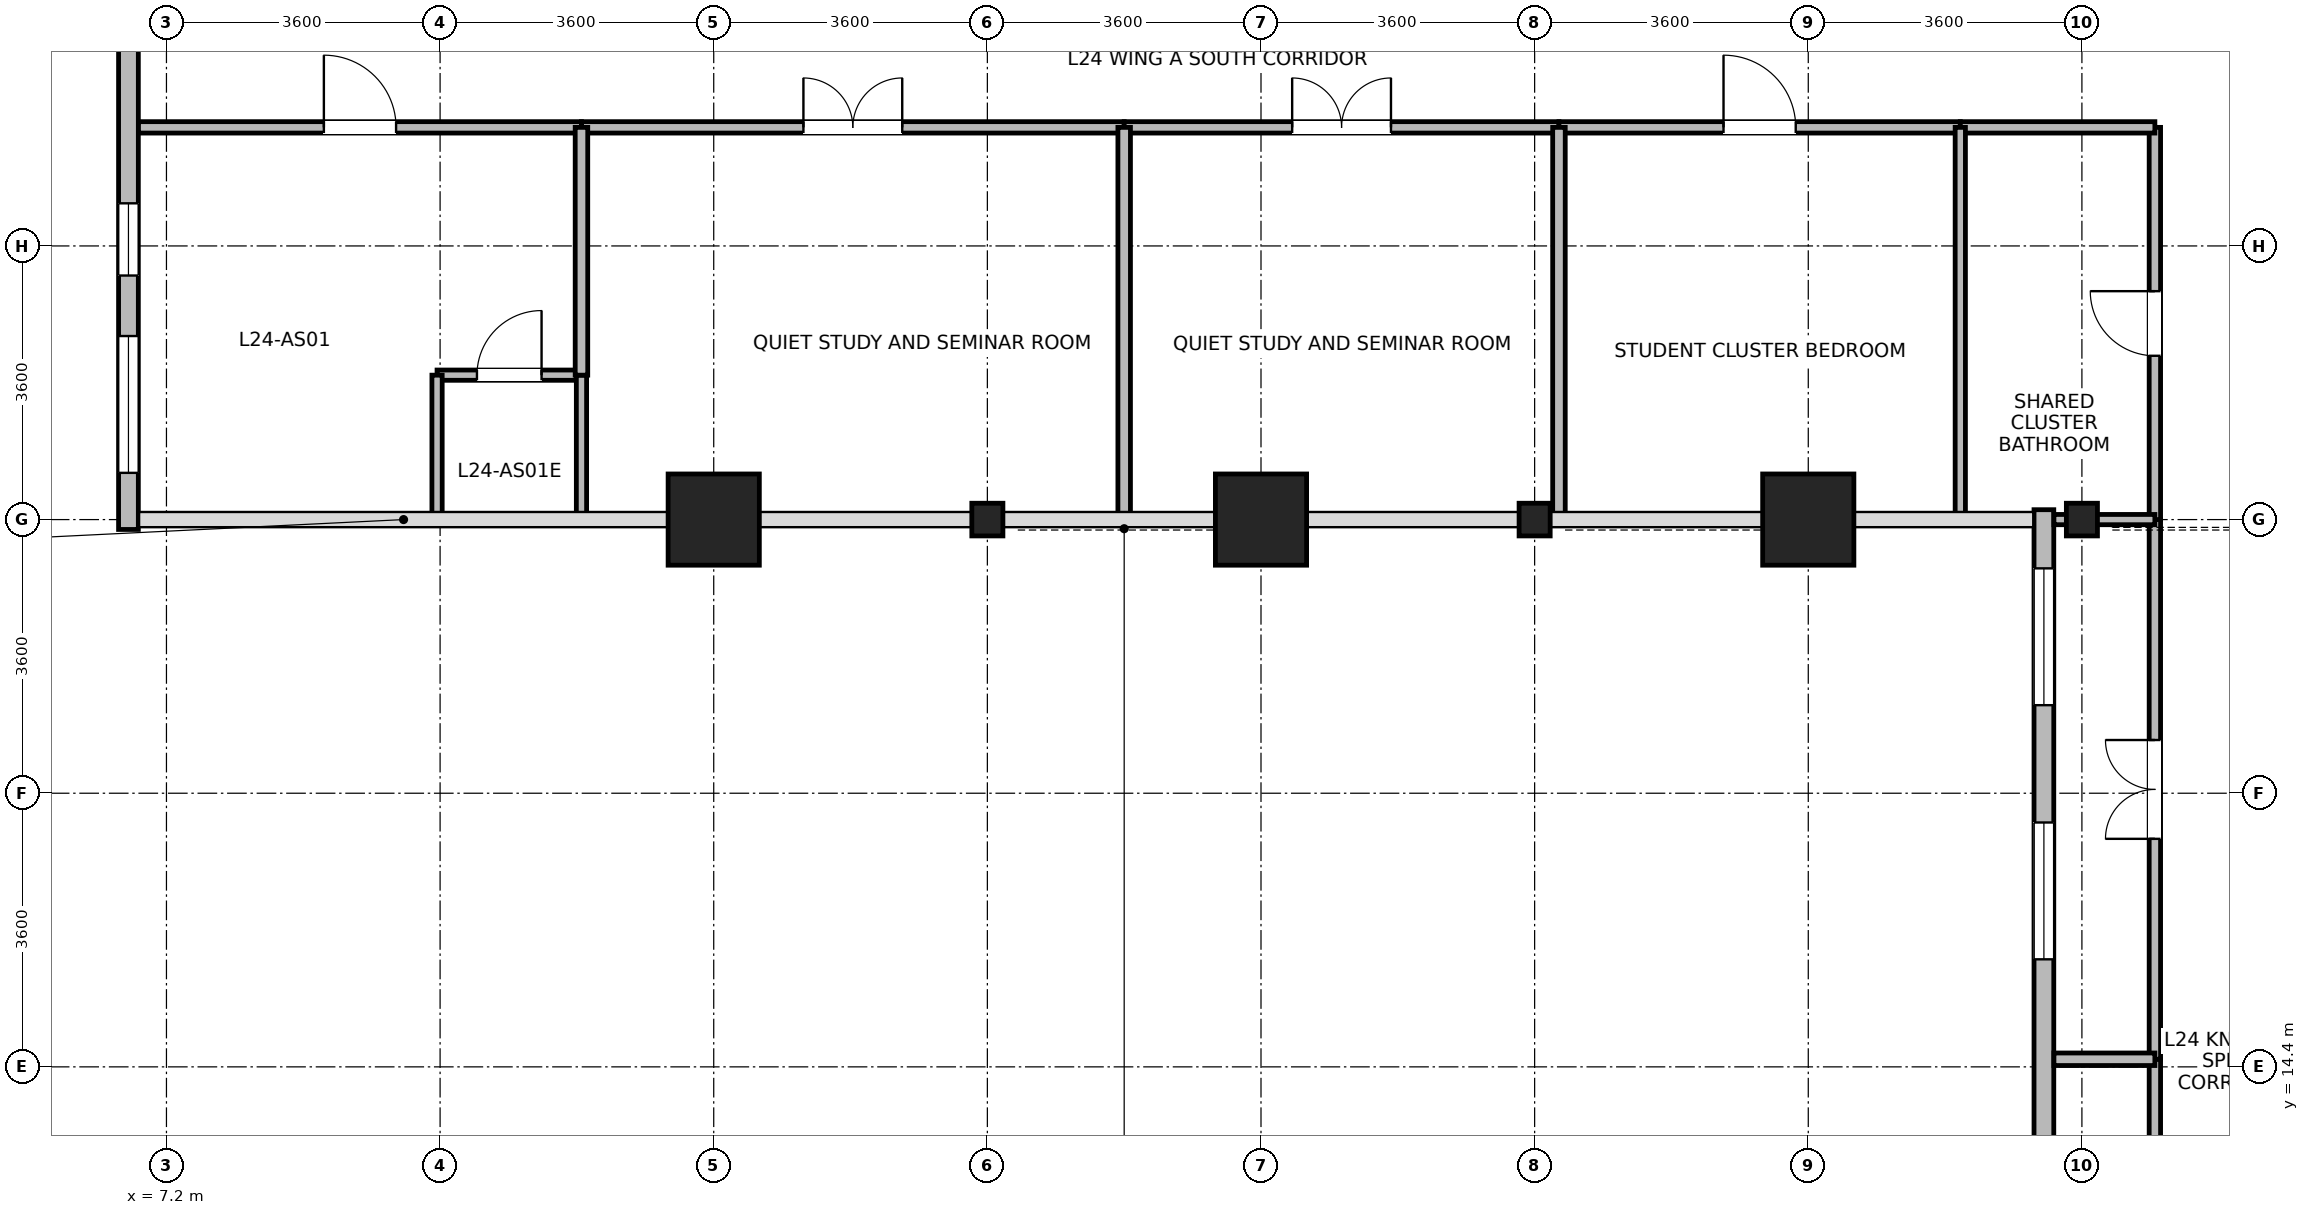
"""IFC4 building model, lengths in metres.
Left out: names, types, materials, properties, quantities, classifications, styles, units other than length and angle.
Written with IfcOpenShell. Run it as: python <this file> out.ifc"""

import sys

from ifc_helpers import new_model, si_unit, direction, frame, frame_2d, origin, origin_2d, place, context, subcontext, project, spatial, rectangle, i_section, extrude, source, transform, mapped, element, fill, save


model = new_model("IFC4")
c1 = context("Model", 3, precision=1e-05, world=origin(), true_north=direction((0.0, 1.0)))
c2 = subcontext(c1, "Body", "Model", "MODEL_VIEW")
j1 = project(units=[si_unit("LENGTHUNIT", "METRE"), si_unit("PLANEANGLEUNIT", "RADIAN")], contexts=[c1])
p1 = place(None, origin())
s1 = spatial("IfcSite", under=j1, at=p1, CompositionType="ELEMENT")
p2 = place(p1, origin())
s2 = spatial("IfcBuilding", under=s1, at=p2, CompositionType="ELEMENT")
p3 = place(p2, frame((0.0, 0.0, 97.1)))
s3 = spatial("IfcBuildingStorey", under=s2, at=p3, CompositionType="ELEMENT", Elevation=97.1)
m1 = source(origin(), c2, "Body", "SweptSolid", [
    extrude(rectangle(XDim=1.2, YDim=1.2, at=origin_2d()), origin(), (0.0, 0.0, 1.0), 3.7),
])
for number, where, z_axis, x_axis in (
    (1, (14.4, 21.6, 0.0), (0.0, 0.0, 1.0), (1.0, 0.0, 0.0)),
    (2, (21.6, 21.6, 0.0), (0.0, 0.0, 1.0), (1.0, 0.0, 0.0)),
    (3, (28.8, 21.6, 0.0), (0.0, 0.0, 1.0), (1.0, 0.0, 0.0)),
):
    element("IfcColumn", number, at=place(p3, frame(where, z_axis=z_axis, x_axis=x_axis)), inside=s3, PredefinedType="COLUMN", context=c2, shape_type="MappedRepresentation", body=[
        mapped(m1, transform((0.0, 0.0, 0.0), x_axis=(1.0, 0.0, 0.0), y_axis=(0.0, 1.0, 0.0), z_axis=(0.0, 0.0, 1.0), scale=1.0)),
    ])
m2 = source(origin(), c2, "Body", "SweptSolid", [
    extrude(i_section(OverallWidth=0.409, OverallDepth=0.43, WebThickness=0.024, FlangeThickness=0.033, FilletRadius=0.015, at=origin_2d()), origin(), (0.0, 0.0, 1.0), 3.7),
])
for number, where, z_axis, x_axis in (
    (4, (18.0, 21.6, 0.0), (0.0, 0.0, 1.0), (1.0, 0.0, 0.0)),
    (5, (25.2, 21.6, 0.0), (0.0, 0.0, 1.0), (1.0, 0.0, 0.0)),
    (6, (32.4, 21.6, 0.0), (0.0, 0.0, 1.0), (1.0, 0.0, 0.0)),
):
    element("IfcColumn", number, at=place(p3, frame(where, z_axis=z_axis, x_axis=x_axis)), inside=s3, PredefinedType="COLUMN", context=c2, shape_type="MappedRepresentation", body=[
        mapped(m2, transform((0.0, 0.0, 0.0), x_axis=(1.0, 0.0, 0.0), y_axis=(0.0, 1.0, 0.0), z_axis=(0.0, 0.0, 1.0), scale=1.0)),
    ])
p4 = place(p3, frame((6.7, 21.47, 0.0), z_axis=(0.0, 0.0, 1.0), x_axis=(0.0, 1.0, 0.0)))
e7 = element("IfcWall", 7, at=p4, inside=s3, PredefinedType="STANDARD", context=c2, shape_type="SweptSolid", body=[
    extrude(rectangle(XDim=6.579, YDim=0.26, at=frame_2d((3.29, 0.0))), origin(), (0.0, 0.0, 1.0), 3.43),
])
p5 = place(p4, frame((0.745, 0.0, 0.85)))
e8 = element("IfcOpeningElement", 8, at=p5, cuts=e7, PredefinedType="OPENING", context=c2, shape_type="SweptSolid", body=[
    extrude(rectangle(XDim=1.8, YDim=1.85, at=frame_2d((0.9, 0.925))), frame((0.0, 0.14, 0.0), z_axis=(0.0, -1.0, 0.0), x_axis=(1.0, 0.0, 0.0)), (0.0, 0.0, 1.0), 0.28),
])
p6 = place(p4, frame((3.341, 0.0, 0.85)))
e9 = element("IfcOpeningElement", 9, at=p6, cuts=e7, PredefinedType="OPENING", context=c2, shape_type="SweptSolid", body=[
    extrude(rectangle(XDim=0.95, YDim=1.75, at=frame_2d((0.475, 0.875))), frame((0.0, 0.14, 0.0), z_axis=(0.0, -1.0, 0.0), x_axis=(1.0, 0.0, 0.0)), (0.0, 0.0, 1.0), 0.28),
])
p7 = place(p3, frame((31.9, 1.67, 0.0), z_axis=(0.0, 0.0, 1.0), x_axis=(0.0, 1.0, 0.0)))
e10 = element("IfcWall", 10, at=p7, inside=s3, PredefinedType="STANDARD", context=c2, shape_type="SweptSolid", body=[
    extrude(rectangle(XDim=20.06, YDim=0.26, at=frame_2d((10.03, 0.0))), origin(), (0.0, 0.0, 1.0), 3.43),
])
p8 = place(p7, frame((0.772, 0.0, 0.85)))
e11 = element("IfcOpeningElement", 11, at=p8, cuts=e10, PredefinedType="OPENING", context=c2, shape_type="SweptSolid", body=[
    extrude(rectangle(XDim=1.8, YDim=1.85, at=frame_2d((0.9, 0.925))), frame((0.0, 0.14, 0.0), z_axis=(0.0, -1.0, 0.0), x_axis=(1.0, 0.0, 0.0)), (0.0, 0.0, 1.0), 0.28),
])
p9 = place(p7, frame((7.458, 0.0, 0.85)))
e12 = element("IfcOpeningElement", 12, at=p9, cuts=e10, PredefinedType="OPENING", context=c2, shape_type="SweptSolid", body=[
    extrude(rectangle(XDim=1.8, YDim=1.85, at=frame_2d((0.9, 0.925))), frame((0.0, 0.14, 0.0), z_axis=(0.0, -1.0, 0.0), x_axis=(1.0, 0.0, 0.0)), (0.0, 0.0, 1.0), 0.28),
])
p10 = place(p7, frame((14.145, 0.0, 0.85)))
e13 = element("IfcOpeningElement", 13, at=p10, cuts=e10, PredefinedType="OPENING", context=c2, shape_type="SweptSolid", body=[
    extrude(rectangle(XDim=1.8, YDim=1.85, at=frame_2d((0.9, 0.925))), frame((0.0, 0.14, 0.0), z_axis=(0.0, -1.0, 0.0), x_axis=(1.0, 0.0, 0.0)), (0.0, 0.0, 1.0), 0.28),
])
p11 = place(p7, frame((17.488, 0.0, 0.85)))
e14 = element("IfcOpeningElement", 14, at=p11, cuts=e10, PredefinedType="OPENING", context=c2, shape_type="SweptSolid", body=[
    extrude(rectangle(XDim=1.8, YDim=1.85, at=frame_2d((0.9, 0.925))), frame((0.0, 0.14, 0.0), z_axis=(0.0, -1.0, 0.0), x_axis=(1.0, 0.0, 0.0)), (0.0, 0.0, 1.0), 0.28),
])
p12 = place(p3, frame((10.76, 23.5, 0.0), z_axis=(0.0, 0.0, 1.0), x_axis=(1.0, 0.0, 0.0)))
e15 = element("IfcWall", 15, at=p12, inside=s3, PredefinedType="PARTITIONING", context=c2, shape_type="SweptSolid", body=[
    extrude(rectangle(XDim=1.9, YDim=0.135, at=frame_2d((0.95, 0.0))), origin(), (0.0, 0.0, 1.0), 3.43),
])
p13 = place(p12, frame((0.525, 0.0, 0.0)))
e16 = element("IfcOpeningElement", 16, at=p13, cuts=e15, PredefinedType="OPENING", context=c2, shape_type="SweptSolid", body=[
    extrude(rectangle(XDim=0.85, YDim=2.04, at=frame_2d((0.425, 1.02))), frame((0.0, 0.078, 0.0), z_axis=(0.0, -1.0, 0.0), x_axis=(1.0, 0.0, 0.0)), (0.0, 0.0, 1.0), 0.155),
])
for number, where, z_axis, x_axis in (
    (17, (10.76, 21.62, 0.0), (0.0, 0.0, 1.0), (0.0, 1.0, 0.0)),
    (18, (12.66, 21.62, 0.0), (0.0, 0.0, 1.0), (0.0, 1.0, 0.0)),
):
    element("IfcWall", number, at=place(p3, frame(where, z_axis=z_axis, x_axis=x_axis)), inside=s3, PredefinedType="PARTITIONING", context=c2, shape_type="SweptSolid", body=[
        extrude(rectangle(XDim=1.88, YDim=0.135, at=frame_2d((0.94, 0.0))), origin(), (0.0, 0.0, 1.0), 3.43),
    ])
p14 = place(p3, frame((33.36, 7.24, 0.0), z_axis=(0.0, 0.0, 1.0), x_axis=(0.0, 1.0, 0.0)))
e19 = element("IfcWall", 19, at=p14, inside=s3, PredefinedType="PARTITIONING", context=c2, shape_type="SweptSolid", body=[
    extrude(rectangle(XDim=7.26, YDim=0.15, at=frame_2d((3.63, 0.0))), origin(), (0.0, 0.0, 1.0), 3.43),
])
p15 = place(p14, frame((2.98, 0.0, 0.0)))
e20 = element("IfcOpeningElement", 20, at=p15, cuts=e19, PredefinedType="OPENING", context=c2, shape_type="SweptSolid", body=[
    extrude(rectangle(XDim=1.3, YDim=2.12, at=frame_2d((0.65, 1.06))), frame((0.0, 0.085, 0.0), z_axis=(0.0, -1.0, 0.0), x_axis=(1.0, 0.0, 0.0)), (0.0, 0.0, 1.0), 0.17),
])
p16 = place(p3, frame((12.66, 26.76, 0.0), z_axis=(0.0, 0.0, 1.0), x_axis=(1.0, 0.0, 0.0)))
e21 = element("IfcWall", 21, at=p16, inside=s3, PredefinedType="PARTITIONING", context=c2, shape_type="SweptSolid", body=[
    extrude(rectangle(XDim=7.14, YDim=0.15, at=frame_2d((3.57, 0.0))), origin(), (0.0, 0.0, 1.0), 3.43),
])
p17 = place(p16, frame((2.92, 0.0, 0.0)))
e22 = element("IfcOpeningElement", 22, at=p17, cuts=e21, PredefinedType="OPENING", context=c2, shape_type="SweptSolid", body=[
    extrude(rectangle(XDim=1.3, YDim=2.12, at=frame_2d((0.65, 1.06))), frame((0.0, 0.085, 0.0), z_axis=(0.0, -1.0, 0.0), x_axis=(1.0, 0.0, 0.0)), (0.0, 0.0, 1.0), 0.17),
])
p18 = place(p3, frame((33.36, 14.5, 0.0), z_axis=(0.0, 0.0, 1.0), x_axis=(0.0, 1.0, 0.0)))
e23 = element("IfcWall", 23, at=p18, inside=s3, PredefinedType="PARTITIONING", context=c2, shape_type="SweptSolid", body=[
    extrude(rectangle(XDim=7.1, YDim=0.15, at=frame_2d((3.55, 0.0))), origin(), (0.0, 0.0, 1.0), 3.43),
])
p19 = place(p18, frame((2.9, 0.0, 0.0)))
e24 = element("IfcOpeningElement", 24, at=p19, cuts=e23, PredefinedType="OPENING", context=c2, shape_type="SweptSolid", body=[
    extrude(rectangle(XDim=1.3, YDim=2.12, at=frame_2d((0.65, 1.06))), frame((0.0, 0.085, 0.0), z_axis=(0.0, -1.0, 0.0), x_axis=(1.0, 0.0, 0.0)), (0.0, 0.0, 1.0), 0.17),
])
p20 = place(p3, frame((6.832, 26.76, 0.0), z_axis=(0.0, 0.0, 1.0), x_axis=(1.0, 0.0, 0.0)))
e25 = element("IfcWall", 25, at=p20, inside=s3, PredefinedType="PARTITIONING", context=c2, shape_type="SweptSolid", body=[
    extrude(rectangle(XDim=5.828, YDim=0.15, at=frame_2d((2.914, 0.0))), origin(), (0.0, 0.0, 1.0), 3.43),
])
p21 = place(p20, frame((2.439, 0.0, 0.0)))
e26 = element("IfcOpeningElement", 26, at=p21, cuts=e25, PredefinedType="OPENING", context=c2, shape_type="SweptSolid", body=[
    extrude(rectangle(XDim=0.95, YDim=2.1, at=frame_2d((0.475, 1.05))), frame((0.0, 0.085, 0.0), z_axis=(0.0, -1.0, 0.0), x_axis=(1.0, 0.0, 0.0)), (0.0, 0.0, 1.0), 0.17),
])
p22 = place(p3, frame((19.8, 26.76, 0.0), z_axis=(0.0, 0.0, 1.0), x_axis=(1.0, 0.0, 0.0)))
e27 = element("IfcWall", 27, at=p22, inside=s3, PredefinedType="PARTITIONING", context=c2, shape_type="SweptSolid", body=[
    extrude(rectangle(XDim=5.72, YDim=0.15, at=frame_2d((2.86, 0.0))), origin(), (0.0, 0.0, 1.0), 3.43),
])
p23 = place(p22, frame((2.21, 0.0, 0.0)))
e28 = element("IfcOpeningElement", 28, at=p23, cuts=e27, PredefinedType="OPENING", context=c2, shape_type="SweptSolid", body=[
    extrude(rectangle(XDim=1.3, YDim=2.12, at=frame_2d((0.65, 1.06))), frame((0.0, 0.085, 0.0), z_axis=(0.0, -1.0, 0.0), x_axis=(1.0, 0.0, 0.0)), (0.0, 0.0, 1.0), 0.17),
])
p24 = place(p3, frame((25.52, 26.76, 0.0), z_axis=(0.0, 0.0, 1.0), x_axis=(1.0, 0.0, 0.0)))
e29 = element("IfcWall", 29, at=p24, inside=s3, PredefinedType="PARTITIONING", context=c2, shape_type="SweptSolid", body=[
    extrude(rectangle(XDim=5.28, YDim=0.15, at=frame_2d((2.64, 0.0))), origin(), (0.0, 0.0, 1.0), 3.43),
])
p25 = place(p24, frame((2.165, 0.0, 0.0)))
e30 = element("IfcOpeningElement", 30, at=p25, cuts=e29, PredefinedType="OPENING", context=c2, shape_type="SweptSolid", body=[
    extrude(rectangle(XDim=0.95, YDim=2.1, at=frame_2d((0.475, 1.05))), frame((0.0, 0.085, 0.0), z_axis=(0.0, -1.0, 0.0), x_axis=(1.0, 0.0, 0.0)), (0.0, 0.0, 1.0), 0.17),
])
p26 = place(p3, frame((33.36, 21.6, 0.0), z_axis=(0.0, 0.0, 1.0), x_axis=(0.0, 1.0, 0.0)))
e31 = element("IfcWall", 31, at=p26, inside=s3, PredefinedType="PARTITIONING", context=c2, shape_type="SweptSolid", body=[
    extrude(rectangle(XDim=5.16, YDim=0.15, at=frame_2d((2.58, 0.0))), origin(), (0.0, 0.0, 1.0), 3.43),
])
p27 = place(p26, frame((2.155, 0.0, 0.0)))
e32 = element("IfcOpeningElement", 32, at=p27, cuts=e31, PredefinedType="OPENING", context=c2, shape_type="SweptSolid", body=[
    extrude(rectangle(XDim=0.85, YDim=2.04, at=frame_2d((0.425, 1.02))), frame((0.0, 0.085, 0.0), z_axis=(0.0, -1.0, 0.0), x_axis=(1.0, 0.0, 0.0)), (0.0, 0.0, 1.0), 0.17),
])
p28 = place(p3, frame((30.8, 26.76, 0.0), z_axis=(0.0, 0.0, 1.0), x_axis=(1.0, 0.0, 0.0)))
e33 = element("IfcWall", 33, at=p28, inside=s3, PredefinedType="PARTITIONING", context=c2, shape_type="SweptSolid", body=[
    extrude(rectangle(XDim=2.56, YDim=0.15, at=frame_2d((1.28, 0.0))), origin(), (0.0, 0.0, 1.0), 3.43),
])
for number, where, z_axis, x_axis in (
    (34, (19.8, 21.62, 0.0), (0.0, 0.0, 1.0), (0.0, 1.0, 0.0)),
    (35, (25.52, 21.62, 0.0), (0.0, 0.0, 1.0), (0.0, 1.0, 0.0)),
):
    element("IfcWall", number, at=place(p3, frame(where, z_axis=z_axis, x_axis=x_axis)), inside=s3, PredefinedType="PARTITIONING", context=c2, shape_type="SweptSolid", body=[
        extrude(rectangle(XDim=5.14, YDim=0.165, at=frame_2d((2.57, 0.0))), origin(), (0.0, 0.0, 1.0), 3.43),
    ])
p29 = place(p3, frame((30.8, 21.62, 0.0), z_axis=(0.0, 0.0, 1.0), x_axis=(0.0, 1.0, 0.0)))
e36 = element("IfcWall", 36, at=p29, inside=s3, PredefinedType="PARTITIONING", context=c2, shape_type="SweptSolid", body=[
    extrude(rectangle(XDim=5.14, YDim=0.135, at=frame_2d((2.57, 0.0))), origin(), (0.0, 0.0, 1.0), 3.43),
])
p30 = place(p3, frame((12.66, 23.5, 0.0), z_axis=(0.0, 0.0, 1.0), x_axis=(0.0, 1.0, 0.0)))
e37 = element("IfcWall", 37, at=p30, inside=s3, PredefinedType="PARTITIONING", context=c2, shape_type="SweptSolid", body=[
    extrude(rectangle(XDim=3.26, YDim=0.165, at=frame_2d((1.63, 0.0))), origin(), (0.0, 0.0, 1.0), 3.43),
])
p31 = place(p3, frame((32.032, 14.5, 0.0), z_axis=(0.0, 0.0, 1.0), x_axis=(1.0, 0.0, 0.0)))
e38 = element("IfcWall", 38, at=p31, inside=s3, PredefinedType="PARTITIONING", context=c2, shape_type="SweptSolid", body=[
    extrude(rectangle(XDim=1.328, YDim=0.165, at=frame_2d((0.664, 0.0))), origin(), (0.0, 0.0, 1.0), 3.43),
])
p32 = place(p3, frame((32.032, 21.6, 0.0), z_axis=(0.0, 0.0, 1.0), x_axis=(1.0, 0.0, 0.0)))
e39 = element("IfcWall", 39, at=p32, inside=s3, PredefinedType="PARTITIONING", context=c2, shape_type="SweptSolid", body=[
    extrude(rectangle(XDim=1.328, YDim=0.135, at=frame_2d((0.664, 0.0))), origin(), (0.0, 0.0, 1.0), 2.98),
])
p33 = place(p5, origin())
e40 = element("IfcWindow", 40, at=p33, inside=s3, PartitioningType="SINGLE_PANEL", PredefinedType="WINDOW", context=c2, shape_type="SweptSolid", body=[
    extrude(rectangle(XDim=1.8, YDim=1.85, at=frame_2d((0.9, 0.925))), frame((0.0, 0.03, 0.0), z_axis=(0.0, -1.0, 0.0), x_axis=(1.0, 0.0, 0.0)), (0.0, 0.0, 1.0), 0.06),
])
fill(e8, e40)
p34 = place(p6, origin())
e41 = element("IfcWindow", 41, at=p34, inside=s3, PartitioningType="SINGLE_PANEL", PredefinedType="WINDOW", context=c2, shape_type="SweptSolid", body=[
    extrude(rectangle(XDim=0.95, YDim=1.75, at=frame_2d((0.475, 0.875))), frame((0.0, 0.03, 0.0), z_axis=(0.0, -1.0, 0.0), x_axis=(1.0, 0.0, 0.0)), (0.0, 0.0, 1.0), 0.06),
])
fill(e9, e41)
p35 = place(p10, origin())
e42 = element("IfcWindow", 42, at=p35, inside=s3, PartitioningType="SINGLE_PANEL", PredefinedType="WINDOW", context=c2, shape_type="SweptSolid", body=[
    extrude(rectangle(XDim=1.8, YDim=1.85, at=frame_2d((0.9, 0.925))), frame((0.0, 0.03, 0.0), z_axis=(0.0, -1.0, 0.0), x_axis=(1.0, 0.0, 0.0)), (0.0, 0.0, 1.0), 0.06),
])
fill(e13, e42)
p36 = place(p11, origin())
e43 = element("IfcWindow", 43, at=p36, inside=s3, PartitioningType="SINGLE_PANEL", PredefinedType="WINDOW", context=c2, shape_type="SweptSolid", body=[
    extrude(rectangle(XDim=1.8, YDim=1.85, at=frame_2d((0.9, 0.925))), frame((0.0, 0.03, 0.0), z_axis=(0.0, -1.0, 0.0), x_axis=(1.0, 0.0, 0.0)), (0.0, 0.0, 1.0), 0.06),
])
fill(e14, e43)
p37 = place(p13, origin())
e44 = element("IfcDoor", 44, at=p37, inside=s3, OperationType="SINGLE_SWING_RIGHT", PredefinedType="DOOR", context=c2, shape_type="SweptSolid", body=[
    extrude(rectangle(XDim=0.85, YDim=2.04, at=frame_2d((0.425, 1.02))), frame((0.0, 0.025, 0.0), z_axis=(0.0, -1.0, 0.0), x_axis=(1.0, 0.0, 0.0)), (0.0, 0.0, 1.0), 0.05),
])
fill(e16, e44)
p38 = place(p17, origin())
e45 = element("IfcDoor", 45, at=p38, inside=s3, OperationType="DOUBLE_DOOR_SINGLE_SWING", PredefinedType="DOOR", context=c2, shape_type="SweptSolid", body=[
    extrude(rectangle(XDim=1.3, YDim=2.12, at=frame_2d((0.65, 1.06))), frame((0.0, 0.025, 0.0), z_axis=(0.0, -1.0, 0.0), x_axis=(1.0, 0.0, 0.0)), (0.0, 0.0, 1.0), 0.05),
])
fill(e22, e45)
p39 = place(p19, origin())
e46 = element("IfcDoor", 46, at=p39, inside=s3, OperationType="DOUBLE_DOOR_SINGLE_SWING", PredefinedType="DOOR", context=c2, shape_type="SweptSolid", body=[
    extrude(rectangle(XDim=1.3, YDim=2.12, at=frame_2d((0.65, 1.06))), frame((0.0, 0.025, 0.0), z_axis=(0.0, -1.0, 0.0), x_axis=(1.0, 0.0, 0.0)), (0.0, 0.0, 1.0), 0.05),
])
fill(e24, e46)
p40 = place(p21, origin())
e47 = element("IfcDoor", 47, at=p40, inside=s3, OperationType="SINGLE_SWING_LEFT", PredefinedType="DOOR", context=c2, shape_type="SweptSolid", body=[
    extrude(rectangle(XDim=0.95, YDim=2.1, at=frame_2d((0.475, 1.05))), frame((0.0, 0.025, 0.0), z_axis=(0.0, -1.0, 0.0), x_axis=(1.0, 0.0, 0.0)), (0.0, 0.0, 1.0), 0.05),
])
fill(e26, e47)
p41 = place(p23, origin())
e48 = element("IfcDoor", 48, at=p41, inside=s3, OperationType="DOUBLE_DOOR_SINGLE_SWING", PredefinedType="DOOR", context=c2, shape_type="SweptSolid", body=[
    extrude(rectangle(XDim=1.3, YDim=2.12, at=frame_2d((0.65, 1.06))), frame((0.0, 0.025, 0.0), z_axis=(0.0, -1.0, 0.0), x_axis=(1.0, 0.0, 0.0)), (0.0, 0.0, 1.0), 0.05),
])
fill(e28, e48)
p42 = place(p25, origin())
e49 = element("IfcDoor", 49, at=p42, inside=s3, OperationType="SINGLE_SWING_LEFT", PredefinedType="DOOR", context=c2, shape_type="SweptSolid", body=[
    extrude(rectangle(XDim=0.95, YDim=2.1, at=frame_2d((0.475, 1.05))), frame((0.0, 0.025, 0.0), z_axis=(0.0, -1.0, 0.0), x_axis=(1.0, 0.0, 0.0)), (0.0, 0.0, 1.0), 0.05),
])
fill(e30, e49)
p43 = place(p27, origin())
e50 = element("IfcDoor", 50, at=p43, inside=s3, OperationType="SINGLE_SWING_RIGHT", PredefinedType="DOOR", context=c2, shape_type="SweptSolid", body=[
    extrude(rectangle(XDim=0.85, YDim=2.04, at=frame_2d((0.425, 1.02))), frame((0.0, 0.025, 0.0), z_axis=(0.0, -1.0, 0.0), x_axis=(1.0, 0.0, 0.0)), (0.0, 0.0, 1.0), 0.05),
])
fill(e32, e50)
save(model, sys.argv[1])
